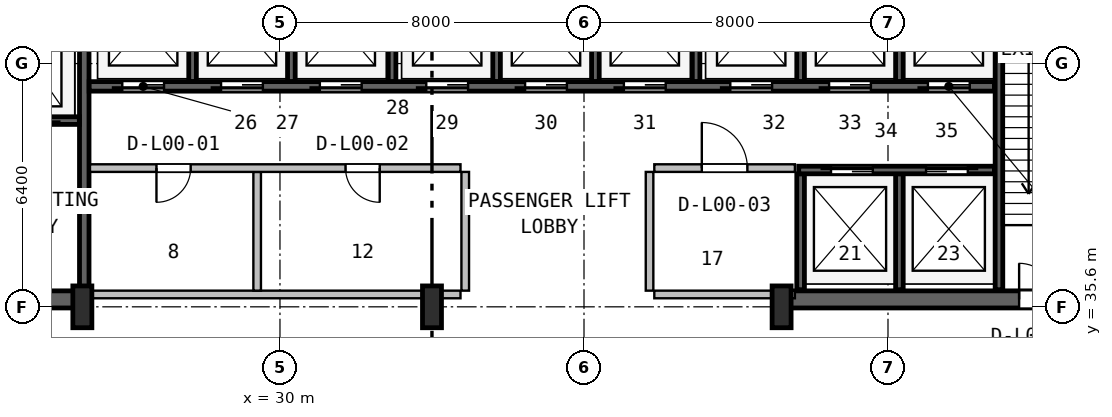
"""IFC4 building model, lengths in metres.
Left out: names, types, materials, properties, quantities, classifications, styles, units other than length and angle.
Written with IfcOpenShell. Run it as: python <this file> out.ifc"""

import sys

from ifc_helpers import new_model, si_unit, direction, frame, frame_2d, origin, origin_2d, place, context, subcontext, project, spatial, rectangle, i_section, extrude, source, transform, mapped, element, fill, save


model = new_model("IFC4")
c1 = context("Model", 3, precision=1e-05, world=origin(), true_north=direction((0.0, 1.0)))
c2 = subcontext(c1, "Body", "Model", "MODEL_VIEW")
j1 = project(units=[si_unit("LENGTHUNIT", "METRE"), si_unit("PLANEANGLEUNIT", "RADIAN")], contexts=[c1])
p1 = place(None, origin())
s1 = spatial("IfcSite", under=j1, at=p1, CompositionType="ELEMENT")
p2 = place(p1, origin())
s2 = spatial("IfcBuilding", under=s1, at=p2, CompositionType="ELEMENT")
p3 = place(p2, origin())
s3 = spatial("IfcBuildingStorey", under=s2, at=p3, CompositionType="ELEMENT", Elevation=0.0)
p4 = place(p3, frame((15.57, 35.795, 0.0), z_axis=(0.0, 0.0, 1.0), x_axis=(1.0, 0.0, 0.0)))
e1 = element("IfcWall", 1, at=p4, inside=s3, PredefinedType="SHEAR", context=c2, shape_type="SweptSolid", body=[
    extrude(rectangle(XDim=9.23, YDim=0.45, at=frame_2d((4.615, 0.0))), origin(), (0.0, 0.0, 1.0), 5.72),
])
p5 = place(p4, frame((5.4, 0.0, 0.0)))
e2 = element("IfcOpeningElement", 2, at=p5, cuts=e1, PredefinedType="OPENING", context=c2, shape_type="SweptSolid", body=[
    extrude(rectangle(XDim=1.0, YDim=2.1, at=frame_2d((0.5, 1.05))), frame((0.0, 0.235, 0.0), z_axis=(0.0, -1.0, 0.0), x_axis=(1.0, 0.0, 0.0)), (0.0, 0.0, 1.0), 0.47),
])
p6 = place(p3, frame((43.2, 35.795, 0.0), z_axis=(0.0, 0.0, 1.0), x_axis=(1.0, 0.0, 0.0)))
e3 = element("IfcWall", 3, at=p6, inside=s3, PredefinedType="SHEAR", context=c2, shape_type="SweptSolid", body=[
    extrude(rectangle(XDim=9.23, YDim=0.45, at=frame_2d((4.615, 0.0))), origin(), (0.0, 0.0, 1.0), 5.72),
])
p7 = place(p6, frame((6.25, 0.0, 0.0)))
e4 = element("IfcOpeningElement", 4, at=p7, cuts=e3, PredefinedType="OPENING", context=c2, shape_type="SweptSolid", body=[
    extrude(rectangle(XDim=0.95, YDim=2.1, at=frame_2d((0.475, 1.05))), frame((0.0, 0.235, 0.0), z_axis=(0.0, -1.0, 0.0), x_axis=(1.0, 0.0, 0.0)), (0.0, 0.0, 1.0), 0.47),
])
m1 = source(origin(), c2, "Body", "SweptSolid", [
    extrude(i_section(OverallWidth=0.5, OverallDepth=1.1, WebThickness=0.018, FlangeThickness=0.032, FilletRadius=0.018, at=origin_2d()), origin(), (0.0, 0.0, 1.0), 6.0),
])
for number, where, z_axis, x_axis in (
    (5, (24.8, 35.6, 0.0), (0.0, 0.0, 1.0), (1.0, 0.0, 0.0)),
    (6, (34.0, 35.6, 0.0), (0.0, 0.0, 1.0), (1.0, 0.0, 0.0)),
    (7, (43.2, 35.6, 0.0), (0.0, 0.0, 1.0), (1.0, 0.0, 0.0)),
):
    element("IfcColumn", number, at=place(p3, frame(where, z_axis=z_axis, x_axis=x_axis)), inside=s3, PredefinedType="COLUMN", context=c2, shape_type="MappedRepresentation", body=[
        mapped(m1, transform((0.0, 0.0, 0.0), x_axis=(1.0, 0.0, 0.0), y_axis=(0.0, 1.0, 0.0), z_axis=(0.0, 0.0, 1.0), scale=1.0)),
    ])
p8 = place(p3, frame((24.85, 36.05, 0.0), z_axis=(0.0, 0.0, 1.0), x_axis=(0.0, 1.0, 0.0)))
e8 = element("IfcWall", 8, at=p8, inside=s3, PredefinedType="SHEAR", context=c2, shape_type="SweptSolid", body=[
    extrude(rectangle(XDim=10.45, YDim=0.25, at=frame_2d((5.225, 0.0))), origin(), (0.0, 0.0, 1.0), 5.72),
])
p9 = place(p3, frame((19.2, 40.5, 0.0), z_axis=(0.0, 0.0, 1.0), x_axis=(1.0, 0.0, 0.0)))
e9 = element("IfcWall", 9, at=p9, inside=s3, PredefinedType="SHEAR", context=c2, shape_type="SweptSolid", body=[
    extrude(rectangle(XDim=5.52, YDim=0.2, at=frame_2d((2.76, 0.0))), origin(), (0.0, 0.0, 1.0), 5.72),
])
p10 = place(p9, frame((1.05, 0.0, 0.0)))
e10 = element("IfcOpeningElement", 10, at=p10, cuts=e9, PredefinedType="OPENING", context=c2, shape_type="SweptSolid", body=[
    extrude(rectangle(XDim=1.1, YDim=2.18, at=frame_2d((0.55, 1.09))), frame((0.0, 0.11, 0.0), z_axis=(0.0, -1.0, 0.0), x_axis=(1.0, 0.0, 0.0)), (0.0, 0.0, 1.0), 0.22),
])
p11 = place(p9, frame((3.65, 0.0, 0.0)))
e11 = element("IfcOpeningElement", 11, at=p11, cuts=e9, PredefinedType="OPENING", context=c2, shape_type="SweptSolid", body=[
    extrude(rectangle(XDim=1.1, YDim=2.18, at=frame_2d((0.55, 1.09))), frame((0.0, 0.11, 0.0), z_axis=(0.0, -1.0, 0.0), x_axis=(1.0, 0.0, 0.0)), (0.0, 0.0, 1.0), 0.22),
])
p12 = place(p3, frame((48.92, 36.05, 0.0), z_axis=(0.0, 0.0, 1.0), x_axis=(0.0, 1.0, 0.0)))
e12 = element("IfcWall", 12, at=p12, inside=s3, PredefinedType="SHEAR", context=c2, shape_type="SweptSolid", body=[
    extrude(rectangle(XDim=10.5, YDim=0.2, at=frame_2d((5.25, 0.0))), origin(), (0.0, 0.0, 1.0), 5.72),
])
p13 = place(p3, frame((24.98, 41.4, 0.0), z_axis=(0.0, 0.0, 1.0), x_axis=(1.0, 0.0, 0.0)))
e13 = element("IfcWall", 13, at=p13, inside=s3, PredefinedType="SHEAR", context=c2, shape_type="SweptSolid", body=[
    extrude(rectangle(XDim=23.82, YDim=0.25, at=frame_2d((11.91, 0.0))), origin(), (0.0, 0.0, 1.0), 5.72),
])
p14 = place(p13, frame((0.87, 0.0, 0.0)))
e14 = element("IfcOpeningElement", 14, at=p14, cuts=e13, PredefinedType="OPENING", context=c2, shape_type="SweptSolid", body=[
    extrude(rectangle(XDim=1.1, YDim=2.18, at=frame_2d((0.55, 1.09))), frame((0.0, 0.135, 0.0), z_axis=(0.0, -1.0, 0.0), x_axis=(1.0, 0.0, 0.0)), (0.0, 0.0, 1.0), 0.27),
])
p15 = place(p13, frame((3.47, 0.0, 0.0)))
e15 = element("IfcOpeningElement", 15, at=p15, cuts=e13, PredefinedType="OPENING", context=c2, shape_type="SweptSolid", body=[
    extrude(rectangle(XDim=1.1, YDim=2.18, at=frame_2d((0.55, 1.09))), frame((0.0, 0.135, 0.0), z_axis=(0.0, -1.0, 0.0), x_axis=(1.0, 0.0, 0.0)), (0.0, 0.0, 1.0), 0.27),
])
p16 = place(p13, frame((6.07, 0.0, 0.0)))
e16 = element("IfcOpeningElement", 16, at=p16, cuts=e13, PredefinedType="OPENING", context=c2, shape_type="SweptSolid", body=[
    extrude(rectangle(XDim=1.1, YDim=2.18, at=frame_2d((0.55, 1.09))), frame((0.0, 0.135, 0.0), z_axis=(0.0, -1.0, 0.0), x_axis=(1.0, 0.0, 0.0)), (0.0, 0.0, 1.0), 0.27),
])
p17 = place(p13, frame((8.87, 0.0, 0.0)))
e17 = element("IfcOpeningElement", 17, at=p17, cuts=e13, PredefinedType="OPENING", context=c2, shape_type="SweptSolid", body=[
    extrude(rectangle(XDim=1.1, YDim=2.18, at=frame_2d((0.55, 1.09))), frame((0.0, 0.135, 0.0), z_axis=(0.0, -1.0, 0.0), x_axis=(1.0, 0.0, 0.0)), (0.0, 0.0, 1.0), 0.27),
])
p18 = place(p13, frame((11.47, 0.0, 0.0)))
e18 = element("IfcOpeningElement", 18, at=p18, cuts=e13, PredefinedType="OPENING", context=c2, shape_type="SweptSolid", body=[
    extrude(rectangle(XDim=1.1, YDim=2.18, at=frame_2d((0.55, 1.09))), frame((0.0, 0.135, 0.0), z_axis=(0.0, -1.0, 0.0), x_axis=(1.0, 0.0, 0.0)), (0.0, 0.0, 1.0), 0.27),
])
p19 = place(p13, frame((14.07, 0.0, 0.0)))
e19 = element("IfcOpeningElement", 19, at=p19, cuts=e13, PredefinedType="OPENING", context=c2, shape_type="SweptSolid", body=[
    extrude(rectangle(XDim=1.1, YDim=2.18, at=frame_2d((0.55, 1.09))), frame((0.0, 0.135, 0.0), z_axis=(0.0, -1.0, 0.0), x_axis=(1.0, 0.0, 0.0)), (0.0, 0.0, 1.0), 0.27),
])
p20 = place(p13, frame((16.87, 0.0, 0.0)))
e20 = element("IfcOpeningElement", 20, at=p20, cuts=e13, PredefinedType="OPENING", context=c2, shape_type="SweptSolid", body=[
    extrude(rectangle(XDim=1.1, YDim=2.18, at=frame_2d((0.55, 1.09))), frame((0.0, 0.135, 0.0), z_axis=(0.0, -1.0, 0.0), x_axis=(1.0, 0.0, 0.0)), (0.0, 0.0, 1.0), 0.27),
])
p21 = place(p13, frame((19.47, 0.0, 0.0)))
e21 = element("IfcOpeningElement", 21, at=p21, cuts=e13, PredefinedType="OPENING", context=c2, shape_type="SweptSolid", body=[
    extrude(rectangle(XDim=1.1, YDim=2.18, at=frame_2d((0.55, 1.09))), frame((0.0, 0.135, 0.0), z_axis=(0.0, -1.0, 0.0), x_axis=(1.0, 0.0, 0.0)), (0.0, 0.0, 1.0), 0.27),
])
p22 = place(p13, frame((22.07, 0.0, 0.0)))
e22 = element("IfcOpeningElement", 22, at=p22, cuts=e13, PredefinedType="OPENING", context=c2, shape_type="SweptSolid", body=[
    extrude(rectangle(XDim=1.1, YDim=2.18, at=frame_2d((0.55, 1.09))), frame((0.0, 0.135, 0.0), z_axis=(0.0, -1.0, 0.0), x_axis=(1.0, 0.0, 0.0)), (0.0, 0.0, 1.0), 0.27),
])
for number, where, z_axis, x_axis in (
    (23, (27.7, 41.53, 0.0), (0.0, 0.0, 1.0), (0.0, 1.0, 0.0)),
    (24, (30.3, 41.53, 0.0), (0.0, 0.0, 1.0), (0.0, 1.0, 0.0)),
):
    element("IfcWall", number, at=place(p3, frame(where, z_axis=z_axis, x_axis=x_axis)), inside=s3, PredefinedType="SHEAR", context=c2, shape_type="SweptSolid", body=[
        extrude(rectangle(XDim=2.87, YDim=0.2, at=frame_2d((1.435, 0.0))), origin(), (0.0, 0.0, 1.0), 5.72),
    ])
p23 = place(p3, frame((32.95, 41.53, 0.0), z_axis=(0.0, 0.0, 1.0), x_axis=(0.0, 1.0, 0.0)))
e25 = element("IfcWall", 25, at=p23, inside=s3, PredefinedType="SHEAR", context=c2, shape_type="SweptSolid", body=[
    extrude(rectangle(XDim=5.02, YDim=0.2, at=frame_2d((2.51, 0.0))), origin(), (0.0, 0.0, 1.0), 5.72),
])
for number, where, z_axis, x_axis in (
    (26, (35.7, 41.53, 0.0), (0.0, 0.0, 1.0), (0.0, 1.0, 0.0)),
    (27, (38.3, 41.53, 0.0), (0.0, 0.0, 1.0), (0.0, 1.0, 0.0)),
):
    element("IfcWall", number, at=place(p3, frame(where, z_axis=z_axis, x_axis=x_axis)), inside=s3, PredefinedType="SHEAR", context=c2, shape_type="SweptSolid", body=[
        extrude(rectangle(XDim=2.87, YDim=0.2, at=frame_2d((1.435, 0.0))), origin(), (0.0, 0.0, 1.0), 5.72),
    ])
p24 = place(p3, frame((40.95, 41.53, 0.0), z_axis=(0.0, 0.0, 1.0), x_axis=(0.0, 1.0, 0.0)))
e28 = element("IfcWall", 28, at=p24, inside=s3, PredefinedType="SHEAR", context=c2, shape_type="SweptSolid", body=[
    extrude(rectangle(XDim=5.02, YDim=0.2, at=frame_2d((2.51, 0.0))), origin(), (0.0, 0.0, 1.0), 5.72),
])
for number, where, z_axis, x_axis in (
    (29, (43.7, 41.53, 0.0), (0.0, 0.0, 1.0), (0.0, 1.0, 0.0)),
    (30, (46.3, 41.53, 0.0), (0.0, 0.0, 1.0), (0.0, 1.0, 0.0)),
):
    element("IfcWall", number, at=place(p3, frame(where, z_axis=z_axis, x_axis=x_axis)), inside=s3, PredefinedType="SHEAR", context=c2, shape_type="SweptSolid", body=[
        extrude(rectangle(XDim=2.87, YDim=0.2, at=frame_2d((1.435, 0.0))), origin(), (0.0, 0.0, 1.0), 5.72),
    ])
for number, where, z_axis, x_axis in (
    (31, (43.7, 36.05, 0.0), (0.0, 0.0, 1.0), (0.0, 1.0, 0.0)),
    (32, (46.3, 36.05, 0.0), (0.0, 0.0, 1.0), (0.0, 1.0, 0.0)),
):
    element("IfcWall", number, at=place(p3, frame(where, z_axis=z_axis, x_axis=x_axis)), inside=s3, PredefinedType="SHEAR", context=c2, shape_type="SweptSolid", body=[
        extrude(rectangle(XDim=3.05, YDim=0.2, at=frame_2d((1.525, 0.0))), origin(), (0.0, 0.0, 1.0), 5.72),
    ])
p25 = place(p3, frame((43.65, 39.2, 0.0), z_axis=(0.0, 0.0, 1.0), x_axis=(1.0, 0.0, 0.0)))
e33 = element("IfcWall", 33, at=p25, inside=s3, PredefinedType="SHEAR", context=c2, shape_type="SweptSolid", body=[
    extrude(rectangle(XDim=5.15, YDim=0.2, at=frame_2d((2.575, 0.0))), origin(), (0.0, 0.0, 1.0), 5.72),
])
p26 = place(p25, frame((0.85, 0.0, 0.0)))
e34 = element("IfcOpeningElement", 34, at=p26, cuts=e33, PredefinedType="OPENING", context=c2, shape_type="SweptSolid", body=[
    extrude(rectangle(XDim=1.1, YDim=2.18, at=frame_2d((0.55, 1.09))), frame((0.0, 0.11, 0.0), z_axis=(0.0, -1.0, 0.0), x_axis=(1.0, 0.0, 0.0)), (0.0, 0.0, 1.0), 0.22),
])
p27 = place(p25, frame((3.35, 0.0, 0.0)))
e35 = element("IfcOpeningElement", 35, at=p27, cuts=e33, PredefinedType="OPENING", context=c2, shape_type="SweptSolid", body=[
    extrude(rectangle(XDim=1.1, YDim=2.18, at=frame_2d((0.55, 1.09))), frame((0.0, 0.11, 0.0), z_axis=(0.0, -1.0, 0.0), x_axis=(1.0, 0.0, 0.0)), (0.0, 0.0, 1.0), 0.22),
])
p28 = place(p3, frame((25.0, 35.925, 0.0), z_axis=(0.0, 0.0, 1.0), x_axis=(1.0, 0.0, 0.0)))
e36 = element("IfcWall", 36, at=p28, inside=s3, PredefinedType="PLUMBINGWALL", context=c2, shape_type="SweptSolid", body=[
    extrude(rectangle(XDim=9.75, YDim=0.2, at=frame_2d((4.875, 0.0))), origin(), (0.0, 0.0, 1.0), 4.783),
])
p29 = place(p3, frame((29.4, 36.025, 0.0), z_axis=(0.0, 0.0, 1.0), x_axis=(0.0, 1.0, 0.0)))
e37 = element("IfcWall", 37, at=p29, inside=s3, PredefinedType="PLUMBINGWALL", context=c2, shape_type="SweptSolid", body=[
    extrude(rectangle(XDim=3.125, YDim=0.2, at=frame_2d((1.562, 0.0))), origin(), (0.0, 0.0, 1.0), 5.7),
])
p30 = place(p3, frame((25.0, 39.25, 0.0), z_axis=(0.0, 0.0, 1.0), x_axis=(1.0, 0.0, 0.0)))
e38 = element("IfcWall", 38, at=p30, inside=s3, PredefinedType="PLUMBINGWALL", context=c2, shape_type="SweptSolid", body=[
    extrude(rectangle(XDim=9.75, YDim=0.2, at=frame_2d((4.875, 0.0))), origin(), (0.0, 0.0, 1.0), 5.7),
])
p31 = place(p30, frame((1.75, 0.0, 0.0)))
e39 = element("IfcOpeningElement", 39, at=p31, cuts=e38, PredefinedType="OPENING", context=c2, shape_type="SweptSolid", body=[
    extrude(rectangle(XDim=0.9, YDim=2.06, at=frame_2d((0.45, 1.03))), frame((0.0, 0.11, 0.0), z_axis=(0.0, -1.0, 0.0), x_axis=(1.0, 0.0, 0.0)), (0.0, 0.0, 1.0), 0.22),
])
p32 = place(p30, frame((6.725, 0.0, 0.0)))
e40 = element("IfcOpeningElement", 40, at=p32, cuts=e38, PredefinedType="OPENING", context=c2, shape_type="SweptSolid", body=[
    extrude(rectangle(XDim=0.9, YDim=2.06, at=frame_2d((0.45, 1.03))), frame((0.0, 0.11, 0.0), z_axis=(0.0, -1.0, 0.0), x_axis=(1.0, 0.0, 0.0)), (0.0, 0.0, 1.0), 0.22),
])
p33 = place(p3, frame((34.875, 36.025, 0.0), z_axis=(0.0, 0.0, 1.0), x_axis=(0.0, 1.0, 0.0)))
e41 = element("IfcWall", 41, at=p33, inside=s3, PredefinedType="PLUMBINGWALL", context=c2, shape_type="SweptSolid", body=[
    extrude(rectangle(XDim=3.125, YDim=0.2, at=frame_2d((1.562, 0.0))), origin(), (0.0, 0.0, 1.0), 5.7),
])
p34 = place(p3, frame((39.85, 35.925, 0.0), z_axis=(0.0, 0.0, 1.0), x_axis=(1.0, 0.0, 0.0)))
e42 = element("IfcWall", 42, at=p34, inside=s3, PredefinedType="SOLIDWALL", context=c2, shape_type="SweptSolid", body=[
    extrude(rectangle(XDim=3.7, YDim=0.2, at=frame_2d((1.85, 0.0))), origin(), (0.0, 0.0, 1.0), 4.783),
])
p35 = place(p3, frame((39.85, 39.25, 0.0), z_axis=(0.0, 0.0, 1.0), x_axis=(1.0, 0.0, 0.0)))
e43 = element("IfcWall", 43, at=p35, inside=s3, PredefinedType="SOLIDWALL", context=c2, shape_type="SweptSolid", body=[
    extrude(rectangle(XDim=3.7, YDim=0.2, at=frame_2d((1.85, 0.0))), origin(), (0.0, 0.0, 1.0), 5.7),
])
p36 = place(p35, frame((1.25, 0.0, 0.0)))
e44 = element("IfcOpeningElement", 44, at=p36, cuts=e43, PredefinedType="OPENING", context=c2, shape_type="SweptSolid", body=[
    extrude(rectangle(XDim=1.2, YDim=2.1, at=frame_2d((0.6, 1.05))), frame((0.0, 0.11, 0.0), z_axis=(0.0, -1.0, 0.0), x_axis=(1.0, 0.0, 0.0)), (0.0, 0.0, 1.0), 0.22),
])
p37 = place(p3, frame((39.725, 36.025, 0.0), z_axis=(0.0, 0.0, 1.0), x_axis=(0.0, 1.0, 0.0)))
e45 = element("IfcWall", 45, at=p37, inside=s3, PredefinedType="SOLIDWALL", context=c2, shape_type="SweptSolid", body=[
    extrude(rectangle(XDim=3.125, YDim=0.2, at=frame_2d((1.562, 0.0))), origin(), (0.0, 0.0, 1.0), 5.7),
])
m2 = source(origin(), c2, "Body", "SweptSolid", [
    extrude(rectangle(XDim=0.95, YDim=2.1, at=frame_2d((0.475, 1.05))), frame((0.0, 0.025, 0.0), z_axis=(0.0, -1.0, 0.0), x_axis=(1.0, 0.0, 0.0)), (0.0, 0.0, 1.0), 0.05),
])
p38 = place(p7, origin())
e46 = element("IfcDoor", 46, at=p38, inside=s3, OperationType="SINGLE_SWING_LEFT", PredefinedType="DOOR", context=c2, shape_type="MappedRepresentation", body=[
    mapped(m2, transform((0.0, 0.0, 0.0), x_axis=(1.0, 0.0, 0.0), y_axis=(0.0, 1.0, 0.0), z_axis=(0.0, 0.0, 1.0), scale=1.0)),
])
fill(e4, e46)
m3 = source(origin(), c2, "Body", "SweptSolid", [
    extrude(rectangle(XDim=1.1, YDim=2.18, at=frame_2d((0.55, 1.09))), frame((0.0, 0.025, 0.0), z_axis=(0.0, -1.0, 0.0), x_axis=(1.0, 0.0, 0.0)), (0.0, 0.0, 1.0), 0.05),
])
p39 = place(p14, frame((1.1, 0.0, 0.0), z_axis=(0.0, 0.0, 1.0), x_axis=(-1.0, 0.0, 0.0)))
e47 = element("IfcDoor", 47, at=p39, inside=s3, OperationType="SLIDING_TO_LEFT", PredefinedType="DOOR", context=c2, shape_type="MappedRepresentation", body=[
    mapped(m3, transform((0.0, 0.0, 0.0), x_axis=(1.0, 0.0, 0.0), y_axis=(0.0, 1.0, 0.0), z_axis=(0.0, 0.0, 1.0), scale=1.0)),
])
fill(e14, e47)
p40 = place(p15, frame((1.1, 0.0, 0.0), z_axis=(0.0, 0.0, 1.0), x_axis=(-1.0, 0.0, 0.0)))
e48 = element("IfcDoor", 48, at=p40, inside=s3, OperationType="SLIDING_TO_LEFT", PredefinedType="DOOR", context=c2, shape_type="MappedRepresentation", body=[
    mapped(m3, transform((0.0, 0.0, 0.0), x_axis=(1.0, 0.0, 0.0), y_axis=(0.0, 1.0, 0.0), z_axis=(0.0, 0.0, 1.0), scale=1.0)),
])
fill(e15, e48)
p41 = place(p16, frame((1.1, 0.0, 0.0), z_axis=(0.0, 0.0, 1.0), x_axis=(-1.0, 0.0, 0.0)))
e49 = element("IfcDoor", 49, at=p41, inside=s3, OperationType="SLIDING_TO_LEFT", PredefinedType="DOOR", context=c2, shape_type="MappedRepresentation", body=[
    mapped(m3, transform((0.0, 0.0, 0.0), x_axis=(1.0, 0.0, 0.0), y_axis=(0.0, 1.0, 0.0), z_axis=(0.0, 0.0, 1.0), scale=1.0)),
])
fill(e16, e49)
p42 = place(p17, frame((1.1, 0.0, 0.0), z_axis=(0.0, 0.0, 1.0), x_axis=(-1.0, 0.0, 0.0)))
e50 = element("IfcDoor", 50, at=p42, inside=s3, OperationType="SLIDING_TO_LEFT", PredefinedType="DOOR", context=c2, shape_type="MappedRepresentation", body=[
    mapped(m3, transform((0.0, 0.0, 0.0), x_axis=(1.0, 0.0, 0.0), y_axis=(0.0, 1.0, 0.0), z_axis=(0.0, 0.0, 1.0), scale=1.0)),
])
fill(e17, e50)
p43 = place(p18, frame((1.1, 0.0, 0.0), z_axis=(0.0, 0.0, 1.0), x_axis=(-1.0, 0.0, 0.0)))
e51 = element("IfcDoor", 51, at=p43, inside=s3, OperationType="SLIDING_TO_LEFT", PredefinedType="DOOR", context=c2, shape_type="MappedRepresentation", body=[
    mapped(m3, transform((0.0, 0.0, 0.0), x_axis=(1.0, 0.0, 0.0), y_axis=(0.0, 1.0, 0.0), z_axis=(0.0, 0.0, 1.0), scale=1.0)),
])
fill(e18, e51)
p44 = place(p19, frame((1.1, 0.0, 0.0), z_axis=(0.0, 0.0, 1.0), x_axis=(-1.0, 0.0, 0.0)))
e52 = element("IfcDoor", 52, at=p44, inside=s3, OperationType="SLIDING_TO_LEFT", PredefinedType="DOOR", context=c2, shape_type="MappedRepresentation", body=[
    mapped(m3, transform((0.0, 0.0, 0.0), x_axis=(1.0, 0.0, 0.0), y_axis=(0.0, 1.0, 0.0), z_axis=(0.0, 0.0, 1.0), scale=1.0)),
])
fill(e19, e52)
p45 = place(p20, frame((1.1, 0.0, 0.0), z_axis=(0.0, 0.0, 1.0), x_axis=(-1.0, 0.0, 0.0)))
e53 = element("IfcDoor", 53, at=p45, inside=s3, OperationType="SLIDING_TO_LEFT", PredefinedType="DOOR", context=c2, shape_type="MappedRepresentation", body=[
    mapped(m3, transform((0.0, 0.0, 0.0), x_axis=(1.0, 0.0, 0.0), y_axis=(0.0, 1.0, 0.0), z_axis=(0.0, 0.0, 1.0), scale=1.0)),
])
fill(e20, e53)
p46 = place(p21, frame((1.1, 0.0, 0.0), z_axis=(0.0, 0.0, 1.0), x_axis=(-1.0, 0.0, 0.0)))
e54 = element("IfcDoor", 54, at=p46, inside=s3, OperationType="SLIDING_TO_LEFT", PredefinedType="DOOR", context=c2, shape_type="MappedRepresentation", body=[
    mapped(m3, transform((0.0, 0.0, 0.0), x_axis=(1.0, 0.0, 0.0), y_axis=(0.0, 1.0, 0.0), z_axis=(0.0, 0.0, 1.0), scale=1.0)),
])
fill(e21, e54)
p47 = place(p22, frame((1.1, 0.0, 0.0), z_axis=(0.0, 0.0, 1.0), x_axis=(-1.0, 0.0, 0.0)))
e55 = element("IfcDoor", 55, at=p47, inside=s3, OperationType="SLIDING_TO_LEFT", PredefinedType="DOOR", context=c2, shape_type="MappedRepresentation", body=[
    mapped(m3, transform((0.0, 0.0, 0.0), x_axis=(1.0, 0.0, 0.0), y_axis=(0.0, 1.0, 0.0), z_axis=(0.0, 0.0, 1.0), scale=1.0)),
])
fill(e22, e55)
p48 = place(p26, origin())
e56 = element("IfcDoor", 56, at=p48, inside=s3, OperationType="SLIDING_TO_LEFT", PredefinedType="DOOR", context=c2, shape_type="MappedRepresentation", body=[
    mapped(m3, transform((0.0, 0.0, 0.0), x_axis=(1.0, 0.0, 0.0), y_axis=(0.0, 1.0, 0.0), z_axis=(0.0, 0.0, 1.0), scale=1.0)),
])
fill(e34, e56)
p49 = place(p27, origin())
e57 = element("IfcDoor", 57, at=p49, inside=s3, OperationType="SLIDING_TO_RIGHT", PredefinedType="DOOR", context=c2, shape_type="MappedRepresentation", body=[
    mapped(m3, transform((0.0, 0.0, 0.0), x_axis=(1.0, 0.0, 0.0), y_axis=(0.0, 1.0, 0.0), z_axis=(0.0, 0.0, 1.0), scale=1.0)),
])
fill(e35, e57)
m4 = source(origin(), c2, "Body", "SweptSolid", [
    extrude(rectangle(XDim=0.9, YDim=2.06, at=frame_2d((0.45, 1.03))), frame((0.0, 0.025, 0.0), z_axis=(0.0, -1.0, 0.0), x_axis=(1.0, 0.0, 0.0)), (0.0, 0.0, 1.0), 0.05),
])
p50 = place(p31, frame((0.9, 0.0, 0.0), z_axis=(0.0, 0.0, 1.0), x_axis=(-1.0, 0.0, 0.0)))
e58 = element("IfcDoor", 58, at=p50, inside=s3, OperationType="SINGLE_SWING_LEFT", PredefinedType="DOOR", context=c2, shape_type="MappedRepresentation", body=[
    mapped(m4, transform((0.0, 0.0, 0.0), x_axis=(1.0, 0.0, 0.0), y_axis=(0.0, 1.0, 0.0), z_axis=(0.0, 0.0, 1.0), scale=1.0)),
])
fill(e39, e58)
p51 = place(p32, frame((0.9, 0.0, 0.0), z_axis=(0.0, 0.0, 1.0), x_axis=(-1.0, 0.0, 0.0)))
e59 = element("IfcDoor", 59, at=p51, inside=s3, OperationType="SINGLE_SWING_RIGHT", PredefinedType="DOOR", context=c2, shape_type="MappedRepresentation", body=[
    mapped(m4, transform((0.0, 0.0, 0.0), x_axis=(1.0, 0.0, 0.0), y_axis=(0.0, 1.0, 0.0), z_axis=(0.0, 0.0, 1.0), scale=1.0)),
])
fill(e40, e59)
m5 = source(origin(), c2, "Body", "SweptSolid", [
    extrude(rectangle(XDim=1.2, YDim=2.1, at=frame_2d((0.6, 1.05))), frame((0.0, 0.025, 0.0), z_axis=(0.0, -1.0, 0.0), x_axis=(1.0, 0.0, 0.0)), (0.0, 0.0, 1.0), 0.05),
])
p52 = place(p36, origin())
e60 = element("IfcDoor", 60, at=p52, inside=s3, OperationType="SINGLE_SWING_LEFT", PredefinedType="DOOR", context=c2, shape_type="MappedRepresentation", body=[
    mapped(m5, transform((0.0, 0.0, 0.0), x_axis=(1.0, 0.0, 0.0), y_axis=(0.0, 1.0, 0.0), z_axis=(0.0, 0.0, 1.0), scale=1.0)),
])
fill(e44, e60)
save(model, sys.argv[1])
